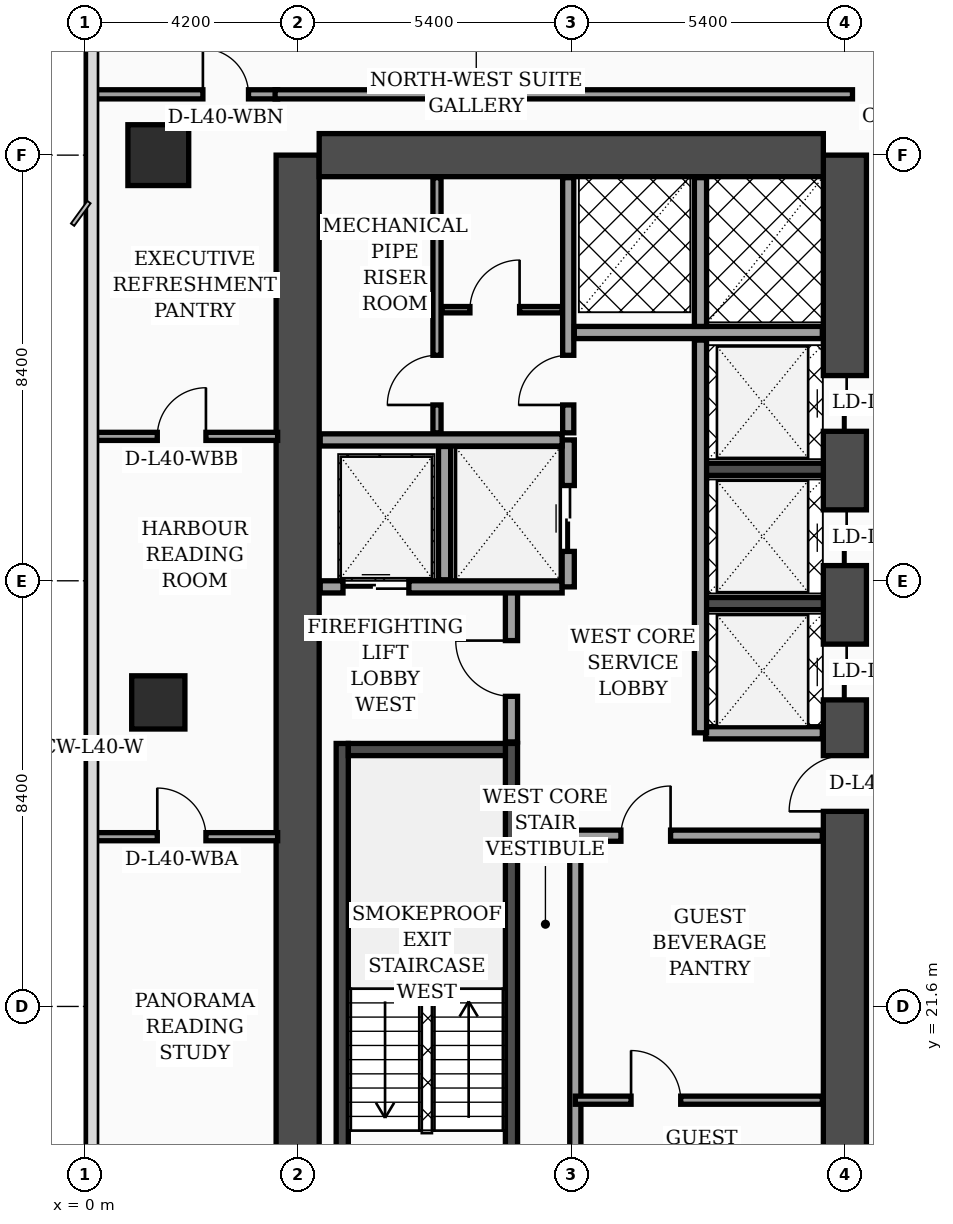
"""IFC4 building model, lengths in metres.
Left out: names, types, materials, properties, quantities, classifications, styles, units other than length and angle.
Written with IfcOpenShell. Run it as: python <this file> out.ifc"""

import sys

from ifc_helpers import new_model, si_unit, direction, frame, frame_2d, origin, origin_2d, place, context, subcontext, project, spatial, rectangle, extrude, element, fill, save


model = new_model("IFC4")
c1 = context("Model", 3, precision=1e-05, world=origin(), true_north=direction((0.0, 1.0)))
c2 = subcontext(c1, "Body", "Model", "MODEL_VIEW")
j1 = project(units=[si_unit("LENGTHUNIT", "METRE"), si_unit("PLANEANGLEUNIT", "RADIAN")], contexts=[c1])
p1 = place(None, origin())
s1 = spatial("IfcSite", under=j1, at=p1, CompositionType="ELEMENT")
p2 = place(p1, origin())
s2 = spatial("IfcBuilding", under=s1, at=p2, CompositionType="ELEMENT")
p3 = place(p2, frame((0.0, 0.0, 163.7)))
s3 = spatial("IfcBuildingStorey", under=s2, at=p3, CompositionType="ELEMENT", Elevation=163.7)
p4 = place(p3, frame((4.2, 16.8, 0.0), z_axis=(0.0, 0.0, 1.0), x_axis=(0.0, 1.0, 0.0)))
e1 = element("IfcWall", 1, at=p4, inside=s3, PredefinedType="SHEAR", context=c2, shape_type="SweptSolid", body=[
    extrude(rectangle(XDim=21.6, YDim=0.85, at=frame_2d((10.8, 0.0))), origin(), (0.0, 0.0, 1.0), 3.56),
])
p5 = place(p3, frame((15.0, 16.8, 0.0), z_axis=(0.0, 0.0, 1.0), x_axis=(0.0, 1.0, 0.0)))
e2 = element("IfcWall", 2, at=p5, inside=s3, PredefinedType="SHEAR", context=c2, shape_type="SweptSolid", body=[
    extrude(rectangle(XDim=21.6, YDim=0.85, at=frame_2d((10.8, 0.0))), origin(), (0.0, 0.0, 1.0), 3.56),
])
p6 = place(p5, frame((8.65, 0.0, 0.0)))
e3 = element("IfcOpeningElement", 3, at=p6, cuts=e2, PredefinedType="OPENING", context=c2, shape_type="SweptSolid", body=[
    extrude(rectangle(XDim=1.1, YDim=2.2, at=frame_2d((0.55, 1.1))), frame((0.0, 0.435, 0.0), z_axis=(0.0, -1.0, 0.0), x_axis=(1.0, 0.0, 0.0)), (0.0, 0.0, 1.0), 0.87),
])
p7 = place(p5, frame((10.85, 0.0, 0.0)))
e4 = element("IfcOpeningElement", 4, at=p7, cuts=e2, PredefinedType="OPENING", context=c2, shape_type="SweptSolid", body=[
    extrude(rectangle(XDim=1.1, YDim=2.2, at=frame_2d((0.55, 1.1))), frame((0.0, 0.435, 0.0), z_axis=(0.0, -1.0, 0.0), x_axis=(1.0, 0.0, 0.0)), (0.0, 0.0, 1.0), 0.87),
])
p8 = place(p5, frame((13.5, 0.0, 0.0)))
e5 = element("IfcOpeningElement", 5, at=p8, cuts=e2, PredefinedType="OPENING", context=c2, shape_type="SweptSolid", body=[
    extrude(rectangle(XDim=1.1, YDim=2.2, at=frame_2d((0.55, 1.1))), frame((0.0, 0.435, 0.0), z_axis=(0.0, -1.0, 0.0), x_axis=(1.0, 0.0, 0.0)), (0.0, 0.0, 1.0), 0.87),
])
p9 = place(p5, frame((16.15, 0.0, 0.0)))
e6 = element("IfcOpeningElement", 6, at=p9, cuts=e2, PredefinedType="OPENING", context=c2, shape_type="SweptSolid", body=[
    extrude(rectangle(XDim=1.1, YDim=2.2, at=frame_2d((0.55, 1.1))), frame((0.0, 0.435, 0.0), z_axis=(0.0, -1.0, 0.0), x_axis=(1.0, 0.0, 0.0)), (0.0, 0.0, 1.0), 0.87),
])
p10 = place(p3, frame((4.625, 38.4, 0.0), z_axis=(0.0, 0.0, 1.0), x_axis=(1.0, 0.0, 0.0)))
e7 = element("IfcWall", 7, at=p10, inside=s3, PredefinedType="SHEAR", context=c2, shape_type="SweptSolid", body=[
    extrude(rectangle(XDim=9.95, YDim=0.85, at=frame_2d((4.975, 0.0))), origin(), (0.0, 0.0, 1.0), 3.56),
])
p11 = place(p3, frame((5.08, 17.225, 0.0), z_axis=(0.0, 0.0, 1.0), x_axis=(0.0, 1.0, 0.0)))
e8 = element("IfcWall", 8, at=p11, inside=s3, PredefinedType="SOLIDWALL", context=c2, shape_type="SweptSolid", body=[
    extrude(rectangle(XDim=9.565, YDim=0.24, at=frame_2d((4.782, 0.0))), origin(), (0.0, 0.0, 1.0), 3.56),
])
p12 = place(p3, frame((8.42, 17.225, 0.0), z_axis=(0.0, 0.0, 1.0), x_axis=(0.0, 1.0, 0.0)))
e9 = element("IfcWall", 9, at=p12, inside=s3, PredefinedType="SOLIDWALL", context=c2, shape_type="SweptSolid", body=[
    extrude(rectangle(XDim=9.565, YDim=0.24, at=frame_2d((4.782, 0.0))), origin(), (0.0, 0.0, 1.0), 3.56),
])
p13 = place(p12, frame((0.35, 0.0, 0.0)))
e10 = element("IfcOpeningElement", 10, at=p13, cuts=e9, PredefinedType="OPENING", context=c2, shape_type="SweptSolid", body=[
    extrude(rectangle(XDim=1.15, YDim=2.2, at=frame_2d((0.575, 1.1))), frame((0.0, 0.13, 0.0), z_axis=(0.0, -1.0, 0.0), x_axis=(1.0, 0.0, 0.0)), (0.0, 0.0, 1.0), 0.26),
])
p14 = place(p3, frame((5.2, 26.67, 0.0), z_axis=(0.0, 0.0, 1.0), x_axis=(1.0, 0.0, 0.0)))
e11 = element("IfcWall", 11, at=p14, inside=s3, PredefinedType="SOLIDWALL", context=c2, shape_type="SweptSolid", body=[
    extrude(rectangle(XDim=3.1, YDim=0.24, at=frame_2d((1.55, 0.0))), origin(), (0.0, 0.0, 1.0), 3.56),
])
for number, where, z_axis, x_axis in (
    (12, (12.18, 29.55, 0.0), (0.0, 0.0, 1.0), (1.0, 0.0, 0.0)),
    (13, (12.18, 32.2, 0.0), (0.0, 0.0, 1.0), (1.0, 0.0, 0.0)),
):
    element("IfcWall", number, at=place(p3, frame(where, z_axis=z_axis, x_axis=x_axis)), inside=s3, PredefinedType="SOLIDWALL", context=c2, shape_type="SweptSolid", body=[
        extrude(rectangle(XDim=2.395, YDim=0.24, at=frame_2d((1.198, 0.0))), origin(), (0.0, 0.0, 1.0), 3.56),
    ])
p15 = place(p3, frame((1.45, 27.6, 0.0), z_axis=(0.0, 0.0, 1.0), x_axis=(1.0, 0.0, 0.0)))
e14 = element("IfcColumn", 14, at=p15, inside=s3, PredefinedType="COLUMN", context=c2, shape_type="SweptSolid", body=[
    extrude(rectangle(XDim=1.05, YDim=1.05, at=origin_2d()), origin(), (0.0, 0.0, 1.0), 3.56),
])
p16 = place(p3, frame((1.45, 38.4, 0.0), z_axis=(0.0, 0.0, 1.0), x_axis=(1.0, 0.0, 0.0)))
e15 = element("IfcColumn", 15, at=p16, inside=s3, PredefinedType="COLUMN", context=c2, shape_type="SweptSolid", body=[
    extrude(rectangle(XDim=1.2, YDim=1.2, at=origin_2d()), origin(), (0.0, 0.0, 1.0), 3.56),
])
p17 = place(p3, frame((8.42, 26.82, 0.0), z_axis=(0.0, 0.0, 1.0), x_axis=(0.0, 1.0, 0.0)))
e16 = element("IfcWall", 16, at=p17, inside=s3, PredefinedType="SOLIDWALL", context=c2, shape_type="SweptSolid", body=[
    extrude(rectangle(XDim=3.0, YDim=0.24, at=frame_2d((1.5, 0.0))), origin(), (0.0, 0.0, 1.0), 3.56),
])
p18 = place(p17, frame((0.9, 0.0, 0.0)))
e17 = element("IfcOpeningElement", 17, at=p18, cuts=e16, PredefinedType="OPENING", context=c2, shape_type="SweptSolid", body=[
    extrude(rectangle(XDim=1.1, YDim=2.2, at=frame_2d((0.55, 1.1))), frame((0.0, 0.13, 0.0), z_axis=(0.0, -1.0, 0.0), x_axis=(1.0, 0.0, 0.0)), (0.0, 0.0, 1.0), 0.26),
])
p19 = place(p3, frame((4.645, 29.88, 0.0), z_axis=(0.0, 0.0, 1.0), x_axis=(1.0, 0.0, 0.0)))
e18 = element("IfcWall", 18, at=p19, inside=s3, PredefinedType="SOLIDWALL", context=c2, shape_type="SweptSolid", body=[
    extrude(rectangle(XDim=4.775, YDim=0.24, at=frame_2d((2.387, 0.0))), origin(), (0.0, 0.0, 1.0), 3.56),
])
p20 = place(p19, frame((0.45, 0.0, 0.0)))
e19 = element("IfcOpeningElement", 19, at=p20, cuts=e18, PredefinedType="OPENING", context=c2, shape_type="SweptSolid", body=[
    extrude(rectangle(XDim=1.3, YDim=2.35, at=frame_2d((0.65, 1.175))), frame((0.0, 0.13, 0.0), z_axis=(0.0, -1.0, 0.0), x_axis=(1.0, 0.0, 0.0)), (0.0, 0.0, 1.0), 0.26),
])
p21 = place(p3, frame((7.1, 30.02, 0.0), z_axis=(0.0, 0.0, 1.0), x_axis=(0.0, 1.0, 0.0)))
e20 = element("IfcWall", 20, at=p21, inside=s3, PredefinedType="SOLIDWALL", context=c2, shape_type="SweptSolid", body=[
    extrude(rectangle(XDim=2.63, YDim=0.24, at=frame_2d((1.315, 0.0))), origin(), (0.0, 0.0, 1.0), 3.56),
])
p22 = place(p3, frame((9.54, 29.88, 0.0), z_axis=(0.0, 0.0, 1.0), x_axis=(0.0, 1.0, 0.0)))
e21 = element("IfcWall", 21, at=p22, inside=s3, PredefinedType="SOLIDWALL", context=c2, shape_type="SweptSolid", body=[
    extrude(rectangle(XDim=2.9, YDim=0.24, at=frame_2d((1.45, 0.0))), origin(), (0.0, 0.0, 1.0), 3.56),
])
p23 = place(p22, frame((0.7, 0.0, 0.0)))
e22 = element("IfcOpeningElement", 22, at=p23, cuts=e21, PredefinedType="OPENING", context=c2, shape_type="SweptSolid", body=[
    extrude(rectangle(XDim=1.3, YDim=2.35, at=frame_2d((0.65, 1.175))), frame((0.0, 0.13, 0.0), z_axis=(0.0, -1.0, 0.0), x_axis=(1.0, 0.0, 0.0)), (0.0, 0.0, 1.0), 0.26),
])
p24 = place(p3, frame((4.645, 32.78, 0.0), z_axis=(0.0, 0.0, 1.0), x_axis=(1.0, 0.0, 0.0)))
e23 = element("IfcWall", 23, at=p24, inside=s3, PredefinedType="SOLIDWALL", context=c2, shape_type="SweptSolid", body=[
    extrude(rectangle(XDim=4.775, YDim=0.24, at=frame_2d((2.387, 0.0))), origin(), (0.0, 0.0, 1.0), 3.19),
])
p25 = place(p3, frame((9.68, 17.245, 0.0), z_axis=(0.0, 0.0, 1.0), x_axis=(0.0, 1.0, 0.0)))
e24 = element("IfcWall", 24, at=p25, inside=s3, PredefinedType="SOLIDWALL", context=c2, shape_type="SweptSolid", body=[
    extrude(rectangle(XDim=7.755, YDim=0.22, at=frame_2d((3.877, 0.0))), origin(), (0.0, 0.0, 1.0), 3.56),
])
p26 = place(p3, frame((6.95, 32.92, 0.0), z_axis=(0.0, 0.0, 1.0), x_axis=(0.0, 1.0, 0.0)))
e25 = element("IfcWall", 25, at=p26, inside=s3, PredefinedType="PARTITIONING", context=c2, shape_type="SweptSolid", body=[
    extrude(rectangle(XDim=5.035, YDim=0.16, at=frame_2d((2.518, 0.0))), origin(), (0.0, 0.0, 1.0), 3.56),
])
p27 = place(p26, frame((0.55, 0.0, 0.0)))
e26 = element("IfcOpeningElement", 26, at=p27, cuts=e25, PredefinedType="OPENING", context=c2, shape_type="SweptSolid", body=[
    extrude(rectangle(XDim=0.98, YDim=2.15, at=frame_2d((0.49, 1.075))), frame((0.0, 0.09, 0.0), z_axis=(0.0, -1.0, 0.0), x_axis=(1.0, 0.0, 0.0)), (0.0, 0.0, 1.0), 0.18),
])
p28 = place(p3, frame((7.05, 35.35, 0.0), z_axis=(0.0, 0.0, 1.0), x_axis=(1.0, 0.0, 0.0)))
e27 = element("IfcWall", 27, at=p28, inside=s3, PredefinedType="PARTITIONING", context=c2, shape_type="SweptSolid", body=[
    extrude(rectangle(XDim=2.37, YDim=0.125, at=frame_2d((1.185, 0.0))), origin(), (0.0, 0.0, 1.0), 3.56),
])
p29 = place(p28, frame((0.55, 0.0, 0.0)))
e28 = element("IfcOpeningElement", 28, at=p29, cuts=e27, PredefinedType="OPENING", context=c2, shape_type="SweptSolid", body=[
    extrude(rectangle(XDim=0.98, YDim=2.15, at=frame_2d((0.49, 1.075))), frame((0.0, 0.073, 0.0), z_axis=(0.0, -1.0, 0.0), x_axis=(1.0, 0.0, 0.0)), (0.0, 0.0, 1.0), 0.145),
])
p30 = place(p3, frame((9.54, 32.92, 0.0), z_axis=(0.0, 0.0, 1.0), x_axis=(0.0, 1.0, 0.0)))
e29 = element("IfcWall", 29, at=p30, inside=s3, PredefinedType="SOLIDWALL", context=c2, shape_type="SweptSolid", body=[
    extrude(rectangle(XDim=5.035, YDim=0.22, at=frame_2d((2.518, 0.0))), origin(), (0.0, 0.0, 1.0), 3.56),
])
p31 = place(p30, frame((0.55, 0.0, 0.0)))
e30 = element("IfcOpeningElement", 30, at=p31, cuts=e29, PredefinedType="OPENING", context=c2, shape_type="SweptSolid", body=[
    extrude(rectangle(XDim=0.98, YDim=2.15, at=frame_2d((0.49, 1.075))), frame((0.0, 0.12, 0.0), z_axis=(0.0, -1.0, 0.0), x_axis=(1.0, 0.0, 0.0)), (0.0, 0.0, 1.0), 0.24),
])
p32 = place(p3, frame((9.68, 19.75, 0.0), z_axis=(0.0, 0.0, 1.0), x_axis=(1.0, 0.0, 0.0)))
e31 = element("IfcWall", 31, at=p32, inside=s3, PredefinedType="PARTITIONING", context=c2, shape_type="SweptSolid", body=[
    extrude(rectangle(XDim=4.875, YDim=0.16, at=frame_2d((2.438, 0.0))), origin(), (0.0, 0.0, 1.0), 3.56),
])
p33 = place(p32, frame((1.1, 0.0, 0.0)))
e32 = element("IfcOpeningElement", 32, at=p33, cuts=e31, PredefinedType="OPENING", context=c2, shape_type="SweptSolid", body=[
    extrude(rectangle(XDim=0.98, YDim=2.15, at=frame_2d((0.49, 1.075))), frame((0.0, 0.09, 0.0), z_axis=(0.0, -1.0, 0.0), x_axis=(1.0, 0.0, 0.0)), (0.0, 0.0, 1.0), 0.18),
])
p34 = place(p3, frame((9.68, 24.97, 0.0), z_axis=(0.0, 0.0, 1.0), x_axis=(1.0, 0.0, 0.0)))
e33 = element("IfcWall", 33, at=p34, inside=s3, PredefinedType="SOLIDWALL", context=c2, shape_type="SweptSolid", body=[
    extrude(rectangle(XDim=4.875, YDim=0.22, at=frame_2d((2.438, 0.0))), origin(), (0.0, 0.0, 1.0), 2.94),
])
p35 = place(p34, frame((0.9, 0.0, 0.0)))
e34 = element("IfcOpeningElement", 34, at=p35, cuts=e33, PredefinedType="OPENING", context=c2, shape_type="SweptSolid", body=[
    extrude(rectangle(XDim=0.98, YDim=2.15, at=frame_2d((0.49, 1.075))), frame((0.0, 0.12, 0.0), z_axis=(0.0, -1.0, 0.0), x_axis=(1.0, 0.0, 0.0)), (0.0, 0.0, 1.0), 0.24),
])
p36 = place(p3, frame((12.25, 27.0, 0.0), z_axis=(0.0, 0.0, 1.0), x_axis=(1.0, 0.0, 0.0)))
e35 = element("IfcWall", 35, at=p36, inside=s3, PredefinedType="SOLIDWALL", context=c2, shape_type="SweptSolid", body=[
    extrude(rectangle(XDim=2.305, YDim=0.24, at=frame_2d((1.152, 0.0))), origin(), (0.0, 0.0, 1.0), 3.56),
])
p37 = place(p3, frame((12.15, 27.0, 0.0), z_axis=(0.0, 0.0, 1.0), x_axis=(0.0, 1.0, 0.0)))
e36 = element("IfcWall", 36, at=p37, inside=s3, PredefinedType="SOLIDWALL", context=c2, shape_type="SweptSolid", body=[
    extrude(rectangle(XDim=7.75, YDim=0.24, at=frame_2d((3.875, 0.0))), origin(), (0.0, 0.0, 1.0), 3.56),
])
p38 = place(p3, frame((9.66, 34.9, 0.0), z_axis=(0.0, 0.0, 1.0), x_axis=(1.0, 0.0, 0.0)))
e37 = element("IfcWall", 37, at=p38, inside=s3, PredefinedType="SOLIDWALL", context=c2, shape_type="SweptSolid", body=[
    extrude(rectangle(XDim=4.895, YDim=0.24, at=frame_2d((2.448, 0.0))), origin(), (0.0, 0.0, 1.0), 3.56),
])
p39 = place(p3, frame((12.15, 35.02, 0.0), z_axis=(0.0, 0.0, 1.0), x_axis=(0.0, 1.0, 0.0)))
e38 = element("IfcWall", 38, at=p39, inside=s3, PredefinedType="SOLIDWALL", context=c2, shape_type="SweptSolid", body=[
    extrude(rectangle(XDim=2.935, YDim=0.24, at=frame_2d((1.468, 0.0))), origin(), (0.0, 0.0, 1.0), 3.56),
])
p40 = place(p3, frame((0.08, 24.95, 0.0), z_axis=(0.0, 0.0, 1.0), x_axis=(1.0, 0.0, 0.0)))
e39 = element("IfcWall", 39, at=p40, inside=s3, PredefinedType="PARTITIONING", context=c2, shape_type="SweptSolid", body=[
    extrude(rectangle(XDim=3.725, YDim=0.16, at=frame_2d((1.862, 0.0))), origin(), (0.0, 0.0, 1.0), 3.04),
])
p41 = place(p40, frame((1.35, 0.0, 0.0)))
e40 = element("IfcOpeningElement", 40, at=p41, cuts=e39, PredefinedType="OPENING", context=c2, shape_type="SweptSolid", body=[
    extrude(rectangle(XDim=0.96, YDim=2.2, at=frame_2d((0.48, 1.1))), frame((0.0, 0.09, 0.0), z_axis=(0.0, -1.0, 0.0), x_axis=(1.0, 0.0, 0.0)), (0.0, 0.0, 1.0), 0.18),
])
p42 = place(p3, frame((0.08, 32.85, 0.0), z_axis=(0.0, 0.0, 1.0), x_axis=(1.0, 0.0, 0.0)))
e41 = element("IfcWall", 41, at=p42, inside=s3, PredefinedType="PARTITIONING", context=c2, shape_type="SweptSolid", body=[
    extrude(rectangle(XDim=3.725, YDim=0.16, at=frame_2d((1.862, 0.0))), origin(), (0.0, 0.0, 1.0), 3.04),
])
p43 = place(p42, frame((1.35, 0.0, 0.0)))
e42 = element("IfcOpeningElement", 42, at=p43, cuts=e41, PredefinedType="OPENING", context=c2, shape_type="SweptSolid", body=[
    extrude(rectangle(XDim=0.96, YDim=2.2, at=frame_2d((0.48, 1.1))), frame((0.0, 0.09, 0.0), z_axis=(0.0, -1.0, 0.0), x_axis=(1.0, 0.0, 0.0)), (0.0, 0.0, 1.0), 0.18),
])
p44 = place(p3, frame((0.08, 39.6, 0.0), z_axis=(0.0, 0.0, 1.0), x_axis=(1.0, 0.0, 0.0)))
e43 = element("IfcWall", 43, at=p44, inside=s3, PredefinedType="PARTITIONING", context=c2, shape_type="SweptSolid", body=[
    extrude(rectangle(XDim=3.725, YDim=0.18, at=frame_2d((1.862, 0.0))), origin(), (0.0, 0.0, 1.0), 2.94),
])
p45 = place(p44, frame((2.25, 0.0, 0.0)))
e44 = element("IfcOpeningElement", 44, at=p45, cuts=e43, PredefinedType="OPENING", context=c2, shape_type="SweptSolid", body=[
    extrude(rectangle(XDim=0.9, YDim=2.15, at=frame_2d((0.45, 1.075))), frame((0.0, 0.1, 0.0), z_axis=(0.0, -1.0, 0.0), x_axis=(1.0, 0.0, 0.0)), (0.0, 0.0, 1.0), 0.2),
])
p46 = place(p3, frame((3.755, 39.6, 0.0), z_axis=(0.0, 0.0, 1.0), x_axis=(1.0, 0.0, 0.0)))
e45 = element("IfcWall", 45, at=p46, inside=s3, PredefinedType="PARTITIONING", context=c2, shape_type="SweptSolid", body=[
    extrude(rectangle(XDim=11.395, YDim=0.18, at=frame_2d((5.698, 0.0))), origin(), (0.0, 0.0, 1.0), 2.94),
])
p47 = place(p18, origin())
e46 = element("IfcDoor", 46, at=p47, inside=s3, OperationType="SINGLE_SWING_RIGHT", PredefinedType="DOOR", context=c2, shape_type="SweptSolid", body=[
    extrude(rectangle(XDim=1.1, YDim=2.2, at=frame_2d((0.55, 1.1))), frame((0.0, 0.025, 0.0), z_axis=(0.0, -1.0, 0.0), x_axis=(1.0, 0.0, 0.0)), (0.0, 0.0, 1.0), 0.05),
])
fill(e17, e46)
p48 = place(p20, origin())
e47 = element("IfcDoor", 47, at=p48, inside=s3, OperationType="DOUBLE_DOOR_SLIDING", PredefinedType="DOOR", context=c2, shape_type="SweptSolid", body=[
    extrude(rectangle(XDim=1.3, YDim=2.35, at=frame_2d((0.65, 1.175))), frame((0.0, 0.025, 0.0), z_axis=(0.0, -1.0, 0.0), x_axis=(1.0, 0.0, 0.0)), (0.0, 0.0, 1.0), 0.05),
])
fill(e19, e47)
p49 = place(p23, origin())
e48 = element("IfcDoor", 48, at=p49, inside=s3, OperationType="DOUBLE_DOOR_SLIDING", PredefinedType="DOOR", context=c2, shape_type="SweptSolid", body=[
    extrude(rectangle(XDim=1.3, YDim=2.35, at=frame_2d((0.65, 1.175))), frame((0.0, 0.025, 0.0), z_axis=(0.0, -1.0, 0.0), x_axis=(1.0, 0.0, 0.0)), (0.0, 0.0, 1.0), 0.05),
])
fill(e22, e48)
p50 = place(p27, origin())
e49 = element("IfcDoor", 49, at=p50, inside=s3, OperationType="SINGLE_SWING_LEFT", PredefinedType="DOOR", context=c2, shape_type="SweptSolid", body=[
    extrude(rectangle(XDim=0.98, YDim=2.15, at=frame_2d((0.49, 1.075))), frame((0.0, 0.025, 0.0), z_axis=(0.0, -1.0, 0.0), x_axis=(1.0, 0.0, 0.0)), (0.0, 0.0, 1.0), 0.05),
])
fill(e26, e49)
p51 = place(p29, origin())
e50 = element("IfcDoor", 50, at=p51, inside=s3, OperationType="SINGLE_SWING_RIGHT", PredefinedType="DOOR", context=c2, shape_type="SweptSolid", body=[
    extrude(rectangle(XDim=0.98, YDim=2.15, at=frame_2d((0.49, 1.075))), frame((0.0, 0.025, 0.0), z_axis=(0.0, -1.0, 0.0), x_axis=(1.0, 0.0, 0.0)), (0.0, 0.0, 1.0), 0.05),
])
fill(e28, e50)
p52 = place(p31, origin())
e51 = element("IfcDoor", 51, at=p52, inside=s3, OperationType="SINGLE_SWING_LEFT", PredefinedType="DOOR", context=c2, shape_type="SweptSolid", body=[
    extrude(rectangle(XDim=0.98, YDim=2.15, at=frame_2d((0.49, 1.075))), frame((0.0, 0.025, 0.0), z_axis=(0.0, -1.0, 0.0), x_axis=(1.0, 0.0, 0.0)), (0.0, 0.0, 1.0), 0.05),
])
fill(e30, e51)
p53 = place(p33, origin())
e52 = element("IfcDoor", 52, at=p53, inside=s3, OperationType="SINGLE_SWING_LEFT", PredefinedType="DOOR", context=c2, shape_type="SweptSolid", body=[
    extrude(rectangle(XDim=0.98, YDim=2.15, at=frame_2d((0.49, 1.075))), frame((0.0, 0.025, 0.0), z_axis=(0.0, -1.0, 0.0), x_axis=(1.0, 0.0, 0.0)), (0.0, 0.0, 1.0), 0.05),
])
fill(e32, e52)
p54 = place(p35, origin())
e53 = element("IfcDoor", 53, at=p54, inside=s3, OperationType="SINGLE_SWING_RIGHT", PredefinedType="DOOR", context=c2, shape_type="SweptSolid", body=[
    extrude(rectangle(XDim=0.98, YDim=2.15, at=frame_2d((0.49, 1.075))), frame((0.0, 0.025, 0.0), z_axis=(0.0, -1.0, 0.0), x_axis=(1.0, 0.0, 0.0)), (0.0, 0.0, 1.0), 0.05),
])
fill(e34, e53)
p55 = place(p41, origin())
e54 = element("IfcDoor", 54, at=p55, inside=s3, OperationType="SINGLE_SWING_LEFT", PredefinedType="DOOR", context=c2, shape_type="SweptSolid", body=[
    extrude(rectangle(XDim=0.96, YDim=2.2, at=frame_2d((0.48, 1.1))), frame((0.0, 0.025, 0.0), z_axis=(0.0, -1.0, 0.0), x_axis=(1.0, 0.0, 0.0)), (0.0, 0.0, 1.0), 0.05),
])
fill(e40, e54)
p56 = place(p43, origin())
e55 = element("IfcDoor", 55, at=p56, inside=s3, OperationType="SINGLE_SWING_RIGHT", PredefinedType="DOOR", context=c2, shape_type="SweptSolid", body=[
    extrude(rectangle(XDim=0.96, YDim=2.2, at=frame_2d((0.48, 1.1))), frame((0.0, 0.025, 0.0), z_axis=(0.0, -1.0, 0.0), x_axis=(1.0, 0.0, 0.0)), (0.0, 0.0, 1.0), 0.05),
])
fill(e42, e55)
p57 = place(p45, origin())
e56 = element("IfcDoor", 56, at=p57, inside=s3, OperationType="SINGLE_SWING_LEFT", PredefinedType="DOOR", context=c2, shape_type="SweptSolid", body=[
    extrude(rectangle(XDim=0.9, YDim=2.15, at=frame_2d((0.45, 1.075))), frame((0.0, 0.025, 0.0), z_axis=(0.0, -1.0, 0.0), x_axis=(1.0, 0.0, 0.0)), (0.0, 0.0, 1.0), 0.05),
])
fill(e44, e56)
p58 = place(p6, origin())
e57 = element("IfcDoor", 57, at=p58, inside=s3, OperationType="SINGLE_SWING_LEFT", PredefinedType="DOOR", context=c2, shape_type="SweptSolid", body=[
    extrude(rectangle(XDim=1.1, YDim=2.2, at=frame_2d((0.55, 1.1))), frame((0.0, 0.025, 0.0), z_axis=(0.0, -1.0, 0.0), x_axis=(1.0, 0.0, 0.0)), (0.0, 0.0, 1.0), 0.05),
])
fill(e3, e57)
p59 = place(p7, origin())
e58 = element("IfcDoor", 58, at=p59, inside=s3, OperationType="DOUBLE_DOOR_SLIDING", PredefinedType="DOOR", context=c2, shape_type="SweptSolid", body=[
    extrude(rectangle(XDim=1.1, YDim=2.2, at=frame_2d((0.55, 1.1))), frame((0.0, 0.025, 0.0), z_axis=(0.0, -1.0, 0.0), x_axis=(1.0, 0.0, 0.0)), (0.0, 0.0, 1.0), 0.05),
])
fill(e4, e58)
p60 = place(p8, origin())
e59 = element("IfcDoor", 59, at=p60, inside=s3, OperationType="DOUBLE_DOOR_SLIDING", PredefinedType="DOOR", context=c2, shape_type="SweptSolid", body=[
    extrude(rectangle(XDim=1.1, YDim=2.2, at=frame_2d((0.55, 1.1))), frame((0.0, 0.025, 0.0), z_axis=(0.0, -1.0, 0.0), x_axis=(1.0, 0.0, 0.0)), (0.0, 0.0, 1.0), 0.05),
])
fill(e5, e59)
p61 = place(p9, origin())
e60 = element("IfcDoor", 60, at=p61, inside=s3, OperationType="DOUBLE_DOOR_SLIDING", PredefinedType="DOOR", context=c2, shape_type="SweptSolid", body=[
    extrude(rectangle(XDim=1.1, YDim=2.2, at=frame_2d((0.55, 1.1))), frame((0.0, 0.025, 0.0), z_axis=(0.0, -1.0, 0.0), x_axis=(1.0, 0.0, 0.0)), (0.0, 0.0, 1.0), 0.05),
])
fill(e6, e60)
save(model, sys.argv[1])
